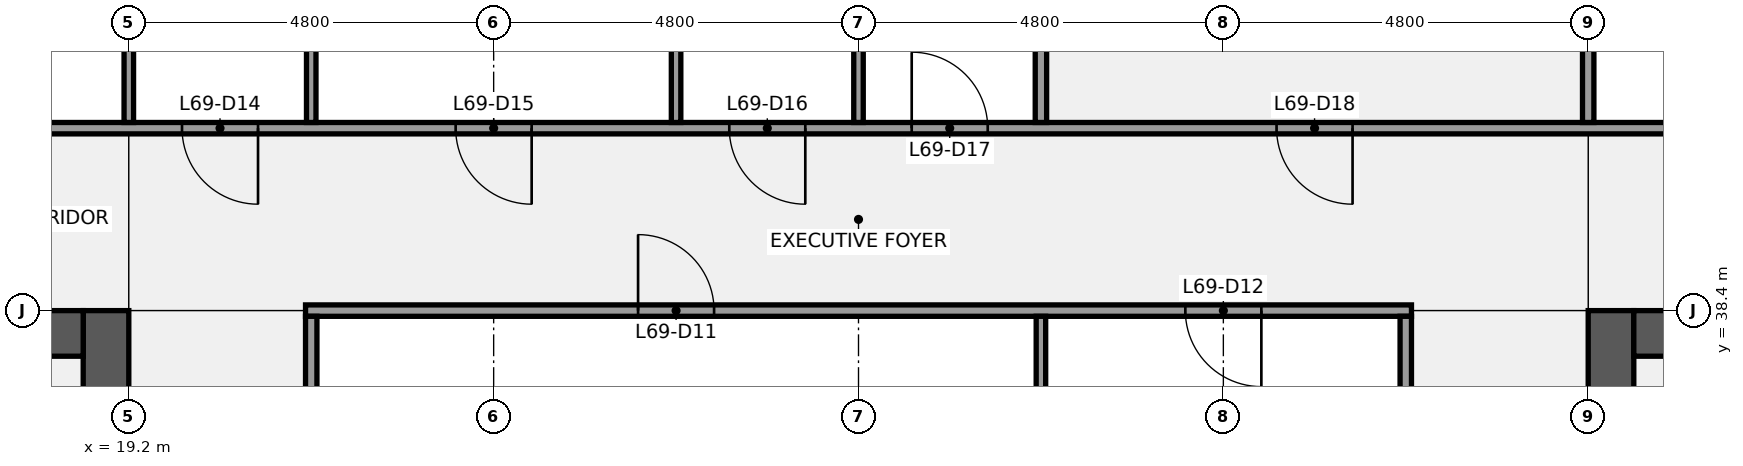
"""IFC4 building model, lengths in metres.
Left out: names, types, materials, properties, quantities, classifications, styles, units other than length and angle.
Written with IfcOpenShell. Run it as: python <this file> out.ifc"""

import sys

from ifc_helpers import new_model, si_unit, direction, frame, frame_2d, origin, place, context, subcontext, project, spatial, rectangle, extrude, element, fill, save


model = new_model("IFC4")
c1 = context("Model", 3, precision=1e-05, world=origin(), true_north=direction((0.0, 1.0)))
c2 = subcontext(c1, "Body", "Model", "MODEL_VIEW")
j1 = project(units=[si_unit("LENGTHUNIT", "METRE"), si_unit("PLANEANGLEUNIT", "RADIAN")], contexts=[c1])
p1 = place(None, origin())
s1 = spatial("IfcSite", under=j1, at=p1, CompositionType="ELEMENT")
p2 = place(p1, origin())
s2 = spatial("IfcBuilding", under=s1, at=p2, CompositionType="ELEMENT")
p3 = place(p2, frame((0.0, 0.0, 314.3)))
s3 = spatial("IfcBuildingStorey", under=s2, at=p3, CompositionType="ELEMENT", Elevation=314.3)
p4 = place(p3, frame((18.9, 38.4, 0.0), z_axis=(0.0, 0.0, 1.0), x_axis=(0.0, -1.0, 0.0)))
e1 = element("IfcWall", 1, at=p4, inside=s3, PredefinedType="SHEAR", context=c2, shape_type="SweptSolid", body=[
    extrude(rectangle(XDim=28.8, YDim=0.6, at=frame_2d((14.4, 0.0))), origin(), (0.0, 0.0, 1.0), 3.84),
])
p5 = place(p4, frame((18.3, 0.0, 0.0)))
e2 = element("IfcOpeningElement", 2, at=p5, cuts=e1, PredefinedType="OPENING", context=c2, shape_type="SweptSolid", body=[
    extrude(rectangle(XDim=1.8, YDim=2.1, at=frame_2d((0.9, 1.05))), frame((0.0, 0.31, 0.0), z_axis=(0.0, -1.0, 0.0), x_axis=(1.0, 0.0, 0.0)), (0.0, 0.0, 1.0), 0.62),
])
p6 = place(p4, frame((8.7, 0.0, 0.0)))
e3 = element("IfcOpeningElement", 3, at=p6, cuts=e1, PredefinedType="OPENING", context=c2, shape_type="SweptSolid", body=[
    extrude(rectangle(XDim=1.8, YDim=2.1, at=frame_2d((0.9, 1.05))), frame((0.0, 0.31, 0.0), z_axis=(0.0, -1.0, 0.0), x_axis=(1.0, 0.0, 0.0)), (0.0, 0.0, 1.0), 0.62),
])
p7 = place(p3, frame((14.4, 38.1, 0.0), z_axis=(0.0, 0.0, 1.0), x_axis=(1.0, 0.0, 0.0)))
e4 = element("IfcWall", 4, at=p7, inside=s3, PredefinedType="SHEAR", context=c2, shape_type="SweptSolid", body=[
    extrude(rectangle(XDim=4.2, YDim=0.6, at=frame_2d((2.1, 0.0))), origin(), (0.0, 0.0, 1.0), 3.84),
])
p8 = place(p7, frame((1.85, 0.0, 0.0)))
e5 = element("IfcOpeningElement", 5, at=p8, cuts=e4, PredefinedType="OPENING", context=c2, shape_type="SweptSolid", body=[
    extrude(rectangle(XDim=1.1, YDim=2.1, at=frame_2d((0.55, 1.05))), frame((0.0, 0.31, 0.0), z_axis=(0.0, -1.0, 0.0), x_axis=(1.0, 0.0, 0.0)), (0.0, 0.0, 1.0), 0.62),
])
p9 = place(p3, frame((38.7, 9.6, 0.0), z_axis=(0.0, 0.0, 1.0), x_axis=(0.0, 1.0, 0.0)))
e6 = element("IfcWall", 6, at=p9, inside=s3, PredefinedType="SHEAR", context=c2, shape_type="SweptSolid", body=[
    extrude(rectangle(XDim=28.8, YDim=0.6, at=frame_2d((14.4, 0.0))), origin(), (0.0, 0.0, 1.0), 3.84),
])
p10 = place(p9, frame((8.7, 0.0, 0.0)))
e7 = element("IfcOpeningElement", 7, at=p10, cuts=e6, PredefinedType="OPENING", context=c2, shape_type="SweptSolid", body=[
    extrude(rectangle(XDim=1.8, YDim=2.1, at=frame_2d((0.9, 1.05))), frame((0.0, 0.31, 0.0), z_axis=(0.0, -1.0, 0.0), x_axis=(1.0, 0.0, 0.0)), (0.0, 0.0, 1.0), 0.62),
])
p11 = place(p9, frame((18.3, 0.0, 0.0)))
e8 = element("IfcOpeningElement", 8, at=p11, cuts=e6, PredefinedType="OPENING", context=c2, shape_type="SweptSolid", body=[
    extrude(rectangle(XDim=1.8, YDim=2.1, at=frame_2d((0.9, 1.05))), frame((0.0, 0.31, 0.0), z_axis=(0.0, -1.0, 0.0), x_axis=(1.0, 0.0, 0.0)), (0.0, 0.0, 1.0), 0.62),
])
p12 = place(p3, frame((39.0, 38.1, 0.0), z_axis=(0.0, 0.0, 1.0), x_axis=(1.0, 0.0, 0.0)))
e9 = element("IfcWall", 9, at=p12, inside=s3, PredefinedType="SHEAR", context=c2, shape_type="SweptSolid", body=[
    extrude(rectangle(XDim=4.2, YDim=0.6, at=frame_2d((2.1, 0.0))), origin(), (0.0, 0.0, 1.0), 3.84),
])
p13 = place(p12, frame((1.25, 0.0, 0.0)))
e10 = element("IfcOpeningElement", 10, at=p13, cuts=e9, PredefinedType="OPENING", context=c2, shape_type="SweptSolid", body=[
    extrude(rectangle(XDim=1.1, YDim=2.1, at=frame_2d((0.55, 1.05))), frame((0.0, 0.31, 0.0), z_axis=(0.0, -1.0, 0.0), x_axis=(1.0, 0.0, 0.0)), (0.0, 0.0, 1.0), 0.62),
])
p14 = place(p3, frame((21.525, 38.4, 0.0), z_axis=(0.0, 0.0, 1.0), x_axis=(1.0, 0.0, 0.0)))
e11 = element("IfcWall", 11, at=p14, inside=s3, PredefinedType="PARTITIONING", context=c2, shape_type="SweptSolid", body=[
    extrude(rectangle(XDim=14.55, YDim=0.15, at=frame_2d((7.275, 0.0))), origin(), (0.0, 0.0, 1.0), 2.87),
])
p15 = place(p14, frame((4.375, 0.0, 0.0)))
e12 = element("IfcOpeningElement", 12, at=p15, cuts=e11, PredefinedType="OPENING", context=c2, shape_type="SweptSolid", body=[
    extrude(rectangle(XDim=1.0, YDim=2.1, at=frame_2d((0.5, 1.05))), frame((0.0, 0.085, 0.0), z_axis=(0.0, -1.0, 0.0), x_axis=(1.0, 0.0, 0.0)), (0.0, 0.0, 1.0), 0.17),
])
p16 = place(p14, frame((11.575, 0.0, 0.0)))
e13 = element("IfcOpeningElement", 13, at=p16, cuts=e11, PredefinedType="OPENING", context=c2, shape_type="SweptSolid", body=[
    extrude(rectangle(XDim=1.0, YDim=2.1, at=frame_2d((0.5, 1.05))), frame((0.0, 0.085, 0.0), z_axis=(0.0, -1.0, 0.0), x_axis=(1.0, 0.0, 0.0)), (0.0, 0.0, 1.0), 0.17),
])
p17 = place(p3, frame((14.5, 40.8, 0.0), z_axis=(0.0, 0.0, 1.0), x_axis=(1.0, 0.0, 0.0)))
e14 = element("IfcWall", 14, at=p17, inside=s3, PredefinedType="PARTITIONING", context=c2, shape_type="SweptSolid", body=[
    extrude(rectangle(XDim=28.6, YDim=0.15, at=frame_2d((14.3, 0.0))), origin(), (0.0, 0.0, 1.0), 2.87),
])
p18 = place(p17, frame((1.85, 0.0, 0.0)))
e15 = element("IfcOpeningElement", 15, at=p18, cuts=e14, PredefinedType="OPENING", context=c2, shape_type="SweptSolid", body=[
    extrude(rectangle(XDim=1.0, YDim=2.1, at=frame_2d((0.5, 1.05))), frame((0.0, 0.085, 0.0), z_axis=(0.0, -1.0, 0.0), x_axis=(1.0, 0.0, 0.0)), (0.0, 0.0, 1.0), 0.17),
])
p19 = place(p17, frame((5.4, 0.0, 0.0)))
e16 = element("IfcOpeningElement", 16, at=p19, cuts=e14, PredefinedType="OPENING", context=c2, shape_type="SweptSolid", body=[
    extrude(rectangle(XDim=1.0, YDim=2.1, at=frame_2d((0.5, 1.05))), frame((0.0, 0.085, 0.0), z_axis=(0.0, -1.0, 0.0), x_axis=(1.0, 0.0, 0.0)), (0.0, 0.0, 1.0), 0.17),
])
p20 = place(p17, frame((9.0, 0.0, 0.0)))
e17 = element("IfcOpeningElement", 17, at=p20, cuts=e14, PredefinedType="OPENING", context=c2, shape_type="SweptSolid", body=[
    extrude(rectangle(XDim=1.0, YDim=2.1, at=frame_2d((0.5, 1.05))), frame((0.0, 0.085, 0.0), z_axis=(0.0, -1.0, 0.0), x_axis=(1.0, 0.0, 0.0)), (0.0, 0.0, 1.0), 0.17),
])
p21 = place(p17, frame((12.6, 0.0, 0.0)))
e18 = element("IfcOpeningElement", 18, at=p21, cuts=e14, PredefinedType="OPENING", context=c2, shape_type="SweptSolid", body=[
    extrude(rectangle(XDim=1.0, YDim=2.1, at=frame_2d((0.5, 1.05))), frame((0.0, 0.085, 0.0), z_axis=(0.0, -1.0, 0.0), x_axis=(1.0, 0.0, 0.0)), (0.0, 0.0, 1.0), 0.17),
])
p22 = place(p17, frame((15.0, 0.0, 0.0)))
e19 = element("IfcOpeningElement", 19, at=p22, cuts=e14, PredefinedType="OPENING", context=c2, shape_type="SweptSolid", body=[
    extrude(rectangle(XDim=1.0, YDim=2.1, at=frame_2d((0.5, 1.05))), frame((0.0, 0.085, 0.0), z_axis=(0.0, -1.0, 0.0), x_axis=(1.0, 0.0, 0.0)), (0.0, 0.0, 1.0), 0.17),
])
p23 = place(p17, frame((19.8, 0.0, 0.0)))
e20 = element("IfcOpeningElement", 20, at=p23, cuts=e14, PredefinedType="OPENING", context=c2, shape_type="SweptSolid", body=[
    extrude(rectangle(XDim=1.0, YDim=2.1, at=frame_2d((0.5, 1.05))), frame((0.0, 0.085, 0.0), z_axis=(0.0, -1.0, 0.0), x_axis=(1.0, 0.0, 0.0)), (0.0, 0.0, 1.0), 0.17),
])
p24 = place(p17, frame((25.75, 0.0, 0.0)))
e21 = element("IfcOpeningElement", 21, at=p24, cuts=e14, PredefinedType="OPENING", context=c2, shape_type="SweptSolid", body=[
    extrude(rectangle(XDim=1.0, YDim=2.1, at=frame_2d((0.5, 1.05))), frame((0.0, 0.085, 0.0), z_axis=(0.0, -1.0, 0.0), x_axis=(1.0, 0.0, 0.0)), (0.0, 0.0, 1.0), 0.17),
])
p25 = place(p3, frame((19.2, 40.875, 0.0), z_axis=(0.0, 0.0, 1.0), x_axis=(0.0, 1.0, 0.0)))
e22 = element("IfcWall", 22, at=p25, inside=s3, PredefinedType="PARTITIONING", context=c2, shape_type="SweptSolid", body=[
    extrude(rectangle(XDim=2.225, YDim=0.125, at=frame_2d((1.113, 0.0))), origin(), (0.0, 0.0, 1.0), 2.87),
])
p26 = place(p3, frame((21.6, 40.875, 0.0), z_axis=(0.0, 0.0, 1.0), x_axis=(0.0, 1.0, 0.0)))
e23 = element("IfcWall", 23, at=p26, inside=s3, PredefinedType="PARTITIONING", context=c2, shape_type="SweptSolid", body=[
    extrude(rectangle(XDim=7.025, YDim=0.125, at=frame_2d((3.512, 0.0))), origin(), (0.0, 0.0, 1.0), 2.87),
])
p27 = place(p3, frame((21.6, 33.675, 0.0), z_axis=(0.0, 0.0, 1.0), x_axis=(0.0, 1.0, 0.0)))
e24 = element("IfcWall", 24, at=p27, inside=s3, PredefinedType="PARTITIONING", context=c2, shape_type="SweptSolid", body=[
    extrude(rectangle(XDim=4.65, YDim=0.15, at=frame_2d((2.325, 0.0))), origin(), (0.0, 0.0, 1.0), 2.87),
])
p28 = place(p3, frame((26.4, 40.875, 0.0), z_axis=(0.0, 0.0, 1.0), x_axis=(0.0, 1.0, 0.0)))
e25 = element("IfcWall", 25, at=p28, inside=s3, PredefinedType="PARTITIONING", context=c2, shape_type="SweptSolid", body=[
    extrude(rectangle(XDim=7.025, YDim=0.125, at=frame_2d((3.512, 0.0))), origin(), (0.0, 0.0, 1.0), 2.87),
])
p29 = place(p3, frame((28.8, 40.875, 0.0), z_axis=(0.0, 0.0, 1.0), x_axis=(0.0, 1.0, 0.0)))
e26 = element("IfcWall", 26, at=p29, inside=s3, PredefinedType="PARTITIONING", context=c2, shape_type="SweptSolid", body=[
    extrude(rectangle(XDim=6.625, YDim=0.125, at=frame_2d((3.312, 0.0))), origin(), (0.0, 0.0, 1.0), 2.87),
])
p30 = place(p3, frame((31.2, 33.663, 0.0), z_axis=(0.0, 0.0, 1.0), x_axis=(0.0, 1.0, 0.0)))
e27 = element("IfcWall", 27, at=p30, inside=s3, PredefinedType="PARTITIONING", context=c2, shape_type="SweptSolid", body=[
    extrude(rectangle(XDim=4.662, YDim=0.125, at=frame_2d((2.331, 0.0))), origin(), (0.0, 0.0, 1.0), 2.87),
])
p31 = place(p3, frame((31.2, 40.875, 0.0), z_axis=(0.0, 0.0, 1.0), x_axis=(0.0, 1.0, 0.0)))
e28 = element("IfcWall", 28, at=p31, inside=s3, PredefinedType="PARTITIONING", context=c2, shape_type="SweptSolid", body=[
    extrude(rectangle(XDim=3.45, YDim=0.15, at=frame_2d((1.725, 0.0))), origin(), (0.0, 0.0, 1.0), 2.87),
])
p32 = place(p3, frame((36.0, 33.675, 0.0), z_axis=(0.0, 0.0, 1.0), x_axis=(0.0, 1.0, 0.0)))
e29 = element("IfcWall", 29, at=p32, inside=s3, PredefinedType="PARTITIONING", context=c2, shape_type="SweptSolid", body=[
    extrude(rectangle(XDim=4.65, YDim=0.15, at=frame_2d((2.325, 0.0))), origin(), (0.0, 0.0, 1.0), 2.87),
])
p33 = place(p3, frame((38.4, 40.875, 0.0), z_axis=(0.0, 0.0, 1.0), x_axis=(0.0, 1.0, 0.0)))
e30 = element("IfcWall", 30, at=p33, inside=s3, PredefinedType="PARTITIONING", context=c2, shape_type="SweptSolid", body=[
    extrude(rectangle(XDim=2.225, YDim=0.15, at=frame_2d((1.113, 0.0))), origin(), (0.0, 0.0, 1.0), 2.87),
])
p34 = place(p15, origin())
e31 = element("IfcDoor", 31, at=p34, inside=s3, OperationType="SINGLE_SWING_LEFT", PredefinedType="DOOR", context=c2, shape_type="SweptSolid", body=[
    extrude(rectangle(XDim=1.0, YDim=2.1, at=frame_2d((0.5, 1.05))), frame((0.0, 0.025, 0.0), z_axis=(0.0, -1.0, 0.0), x_axis=(1.0, 0.0, 0.0)), (0.0, 0.0, 1.0), 0.05),
])
fill(e12, e31)
p35 = place(p16, origin())
e32 = element("IfcDoor", 32, at=p35, inside=s3, OperationType="SINGLE_SWING_RIGHT", PredefinedType="DOOR", context=c2, shape_type="SweptSolid", body=[
    extrude(rectangle(XDim=1.0, YDim=2.1, at=frame_2d((0.5, 1.05))), frame((0.0, 0.025, 0.0), z_axis=(0.0, -1.0, 0.0), x_axis=(1.0, 0.0, 0.0)), (0.0, 0.0, 1.0), 0.05),
])
fill(e13, e32)
p36 = place(p19, origin())
e33 = element("IfcDoor", 33, at=p36, inside=s3, OperationType="SINGLE_SWING_RIGHT", PredefinedType="DOOR", context=c2, shape_type="SweptSolid", body=[
    extrude(rectangle(XDim=1.0, YDim=2.1, at=frame_2d((0.5, 1.05))), frame((0.0, 0.025, 0.0), z_axis=(0.0, -1.0, 0.0), x_axis=(1.0, 0.0, 0.0)), (0.0, 0.0, 1.0), 0.05),
])
fill(e16, e33)
p37 = place(p20, origin())
e34 = element("IfcDoor", 34, at=p37, inside=s3, OperationType="SINGLE_SWING_RIGHT", PredefinedType="DOOR", context=c2, shape_type="SweptSolid", body=[
    extrude(rectangle(XDim=1.0, YDim=2.1, at=frame_2d((0.5, 1.05))), frame((0.0, 0.025, 0.0), z_axis=(0.0, -1.0, 0.0), x_axis=(1.0, 0.0, 0.0)), (0.0, 0.0, 1.0), 0.05),
])
fill(e17, e34)
p38 = place(p21, origin())
e35 = element("IfcDoor", 35, at=p38, inside=s3, OperationType="SINGLE_SWING_RIGHT", PredefinedType="DOOR", context=c2, shape_type="SweptSolid", body=[
    extrude(rectangle(XDim=1.0, YDim=2.1, at=frame_2d((0.5, 1.05))), frame((0.0, 0.025, 0.0), z_axis=(0.0, -1.0, 0.0), x_axis=(1.0, 0.0, 0.0)), (0.0, 0.0, 1.0), 0.05),
])
fill(e18, e35)
p39 = place(p22, origin())
e36 = element("IfcDoor", 36, at=p39, inside=s3, OperationType="SINGLE_SWING_LEFT", PredefinedType="DOOR", context=c2, shape_type="SweptSolid", body=[
    extrude(rectangle(XDim=1.0, YDim=2.1, at=frame_2d((0.5, 1.05))), frame((0.0, 0.025, 0.0), z_axis=(0.0, -1.0, 0.0), x_axis=(1.0, 0.0, 0.0)), (0.0, 0.0, 1.0), 0.05),
])
fill(e19, e36)
p40 = place(p23, origin())
e37 = element("IfcDoor", 37, at=p40, inside=s3, OperationType="SINGLE_SWING_RIGHT", PredefinedType="DOOR", context=c2, shape_type="SweptSolid", body=[
    extrude(rectangle(XDim=1.0, YDim=2.1, at=frame_2d((0.5, 1.05))), frame((0.0, 0.025, 0.0), z_axis=(0.0, -1.0, 0.0), x_axis=(1.0, 0.0, 0.0)), (0.0, 0.0, 1.0), 0.05),
])
fill(e20, e37)
save(model, sys.argv[1])
